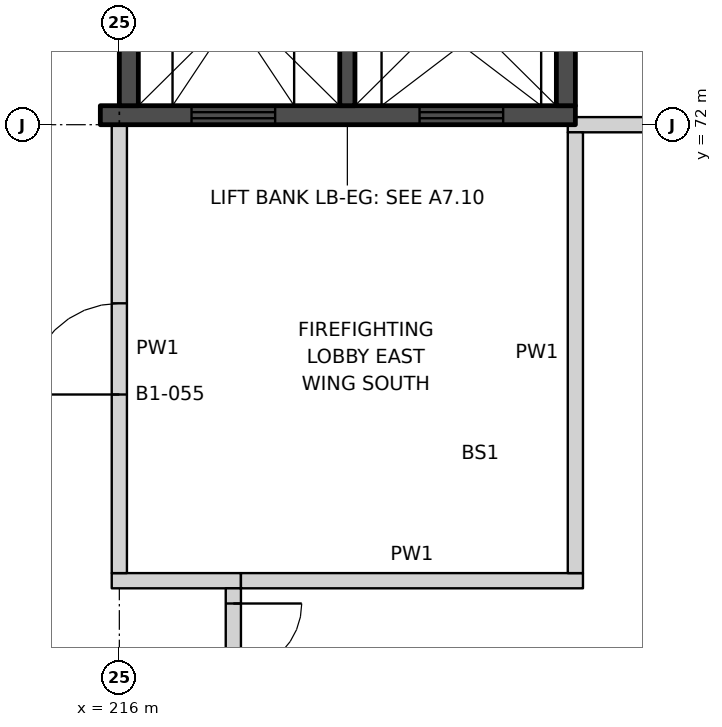
"""IFC4 building model, lengths in metres.
Left out: names, types, materials, properties, quantities, classifications, styles, units other than length and angle.
Written with IfcOpenShell. Run it as: python <this file> out.ifc"""

import sys

from ifc_helpers import new_model, si_unit, direction, frame, frame_2d, origin, place, context, subcontext, project, spatial, rectangle, extrude, element, fill, save


model = new_model("IFC4")
c1 = context("Model", 3, precision=1e-05, world=origin(), true_north=direction((0.0, 1.0)))
c2 = subcontext(c1, "Body", "Model", "MODEL_VIEW")
j1 = project(units=[si_unit("LENGTHUNIT", "METRE"), si_unit("PLANEANGLEUNIT", "RADIAN")], contexts=[c1])
p1 = place(None, origin())
s1 = spatial("IfcSite", under=j1, at=p1, CompositionType="ELEMENT")
p2 = place(p1, origin())
s2 = spatial("IfcBuilding", under=s1, at=p2, CompositionType="ELEMENT")
p3 = place(p2, frame((0.0, 0.0, -6.0)))
s3 = spatial("IfcBuildingStorey", under=s2, at=p3, CompositionType="ELEMENT", Elevation=-6.0)
p4 = place(p3, frame((215.9, 66.0, 0.0), z_axis=(0.0, 0.0, 1.0), x_axis=(1.0, 0.0, 0.0)))
e1 = element("IfcWall", 1, at=p4, inside=s3, PredefinedType="PARTITIONING", context=c2, shape_type="SweptSolid", body=[
    extrude(rectangle(XDim=1.7, YDim=0.2, at=frame_2d((0.85, 0.0))), origin(), (0.0, 0.0, 1.0), 6.0),
])
p5 = place(p3, frame((217.6, 66.0, 0.0), z_axis=(0.0, 0.0, 1.0), x_axis=(1.0, 0.0, 0.0)))
e2 = element("IfcWall", 2, at=p5, inside=s3, PredefinedType="PARTITIONING", context=c2, shape_type="SweptSolid", body=[
    extrude(rectangle(XDim=4.5, YDim=0.2, at=frame_2d((2.25, 0.0))), origin(), (0.0, 0.0, 1.0), 6.0),
])
p6 = place(p3, frame((221.9, 72.0, 0.0), z_axis=(0.0, 0.0, 1.0), x_axis=(1.0, 0.0, 0.0)))
e3 = element("IfcWall", 3, at=p6, inside=s3, PredefinedType="PARTITIONING", context=c2, shape_type="SweptSolid", body=[
    extrude(rectangle(XDim=2.65, YDim=0.2, at=frame_2d((1.325, 0.0))), origin(), (0.0, 0.0, 1.0), 4.85),
])
p7 = place(p3, frame((216.0, 66.1, 0.0), z_axis=(0.0, 0.0, 1.0), x_axis=(0.0, 1.0, 0.0)))
e4 = element("IfcWall", 4, at=p7, inside=s3, PredefinedType="PARTITIONING", context=c2, shape_type="SweptSolid", body=[
    extrude(rectangle(XDim=5.9, YDim=0.2, at=frame_2d((2.95, 0.0))), origin(), (0.0, 0.0, 1.0), 4.55),
])
p8 = place(p7, frame((2.35, 0.0, 0.0)))
e5 = element("IfcOpeningElement", 5, at=p8, cuts=e4, PredefinedType="OPENING", context=c2, shape_type="SweptSolid", body=[
    extrude(rectangle(XDim=1.2, YDim=2.1, at=frame_2d((0.6, 1.05))), frame((0.0, 0.11, 0.0), z_axis=(0.0, -1.0, 0.0), x_axis=(1.0, 0.0, 0.0)), (0.0, 0.0, 1.0), 0.22),
])
p9 = place(p3, frame((217.5, 54.1, 0.0), z_axis=(0.0, 0.0, 1.0), x_axis=(0.0, 1.0, 0.0)))
e6 = element("IfcWall", 6, at=p9, inside=s3, PredefinedType="PARTITIONING", context=c2, shape_type="SweptSolid", body=[
    extrude(rectangle(XDim=11.8, YDim=0.2, at=frame_2d((5.9, 0.0))), origin(), (0.0, 0.0, 1.0), 6.0),
])
p10 = place(p9, frame((3.5, 0.0, 0.0)))
e7 = element("IfcOpeningElement", 7, at=p10, cuts=e6, PredefinedType="OPENING", context=c2, shape_type="SweptSolid", body=[
    extrude(rectangle(XDim=1.8, YDim=2.1, at=frame_2d((0.9, 1.05))), frame((0.0, 0.11, 0.0), z_axis=(0.0, -1.0, 0.0), x_axis=(1.0, 0.0, 0.0)), (0.0, 0.0, 1.0), 0.22),
])
p11 = place(p9, frame((9.8, 0.0, 0.0)))
e8 = element("IfcOpeningElement", 8, at=p11, cuts=e6, PredefinedType="OPENING", context=c2, shape_type="SweptSolid", body=[
    extrude(rectangle(XDim=1.8, YDim=2.1, at=frame_2d((0.9, 1.05))), frame((0.0, 0.11, 0.0), z_axis=(0.0, -1.0, 0.0), x_axis=(1.0, 0.0, 0.0)), (0.0, 0.0, 1.0), 0.22),
])
p12 = place(p3, frame((222.0, 66.1, 0.0), z_axis=(0.0, 0.0, 1.0), x_axis=(0.0, 1.0, 0.0)))
e9 = element("IfcWall", 9, at=p12, inside=s3, PredefinedType="PARTITIONING", context=c2, shape_type="SweptSolid", body=[
    extrude(rectangle(XDim=5.8, YDim=0.2, at=frame_2d((2.9, 0.0))), origin(), (0.0, 0.0, 1.0), 6.0),
])
p13 = place(p3, frame((215.75, 72.125, -1.0), z_axis=(0.0, 0.0, 1.0), x_axis=(1.0, 0.0, 0.0)))
e10 = element("IfcWall", 10, at=p13, inside=s3, PredefinedType="SHEAR", context=c2, shape_type="SweptSolid", body=[
    extrude(rectangle(XDim=6.25, YDim=0.25, at=frame_2d((3.125, 0.0))), origin(), (0.0, 0.0, 1.0), 7.0),
])
p14 = place(p13, frame((1.2, 0.0, 1.0)))
e11 = element("IfcOpeningElement", 11, at=p14, cuts=e10, PredefinedType="OPENING", context=c2, shape_type="SweptSolid", body=[
    extrude(rectangle(XDim=1.1, YDim=2.1, at=frame_2d((0.55, 1.05))), frame((0.0, 0.135, 0.0), z_axis=(0.0, -1.0, 0.0), x_axis=(1.0, 0.0, 0.0)), (0.0, 0.0, 1.0), 0.27),
])
p15 = place(p13, frame((4.2, 0.0, 1.0)))
e12 = element("IfcOpeningElement", 12, at=p15, cuts=e10, PredefinedType="OPENING", context=c2, shape_type="SweptSolid", body=[
    extrude(rectangle(XDim=1.1, YDim=2.1, at=frame_2d((0.55, 1.05))), frame((0.0, 0.135, 0.0), z_axis=(0.0, -1.0, 0.0), x_axis=(1.0, 0.0, 0.0)), (0.0, 0.0, 1.0), 0.27),
])
for number, where, z_axis, x_axis in (
    (13, (216.125, 72.25, -1.0), (0.0, 0.0, 1.0), (0.0, 1.0, 0.0)),
    (14, (221.875, 72.25, -1.0), (0.0, 0.0, 1.0), (0.0, 1.0, 0.0)),
):
    element("IfcWall", number, at=place(p3, frame(where, z_axis=z_axis, x_axis=x_axis)), inside=s3, PredefinedType="SHEAR", context=c2, shape_type="SweptSolid", body=[
        extrude(rectangle(XDim=5.5, YDim=0.25, at=frame_2d((2.75, 0.0))), origin(), (0.0, 0.0, 1.0), 7.0),
    ])
p16 = place(p3, frame((219.0, 72.25, -1.0), z_axis=(0.0, 0.0, 1.0), x_axis=(0.0, 1.0, 0.0)))
e15 = element("IfcWall", 15, at=p16, inside=s3, PredefinedType="SHEAR", context=c2, shape_type="SweptSolid", body=[
    extrude(rectangle(XDim=2.625, YDim=0.2, at=frame_2d((1.312, 0.0))), origin(), (0.0, 0.0, 1.0), 7.0),
])
p17 = place(p8, origin())
e16 = element("IfcDoor", 16, at=p17, inside=s3, OperationType="SINGLE_SWING_LEFT", PredefinedType="DOOR", context=c2, shape_type="SweptSolid", body=[
    extrude(rectangle(XDim=1.2, YDim=2.1, at=frame_2d((0.6, 1.05))), frame((0.0, 0.025, 0.0), z_axis=(0.0, -1.0, 0.0), x_axis=(1.0, 0.0, 0.0)), (0.0, 0.0, 1.0), 0.05),
])
fill(e5, e16)
p18 = place(p11, frame((1.8, 0.0, 0.0), z_axis=(0.0, 0.0, 1.0), x_axis=(-1.0, 0.0, 0.0)))
e17 = element("IfcDoor", 17, at=p18, inside=s3, OperationType="DOUBLE_DOOR_DOUBLE_SWING", PredefinedType="DOOR", context=c2, shape_type="SweptSolid", body=[
    extrude(rectangle(XDim=1.8, YDim=2.1, at=frame_2d((0.9, 1.05))), frame((0.0, 0.025, 0.0), z_axis=(0.0, -1.0, 0.0), x_axis=(1.0, 0.0, 0.0)), (0.0, 0.0, 1.0), 0.05),
])
fill(e8, e17)
p19 = place(p14, origin())
e18 = element("IfcDoor", 18, at=p19, inside=s3, OperationType="DOUBLE_DOOR_SLIDING", PredefinedType="DOOR", context=c2, shape_type="SweptSolid", body=[
    extrude(rectangle(XDim=1.1, YDim=2.1, at=frame_2d((0.55, 1.05))), frame((0.0, 0.025, 0.0), z_axis=(0.0, -1.0, 0.0), x_axis=(1.0, 0.0, 0.0)), (0.0, 0.0, 1.0), 0.05),
])
fill(e11, e18)
p20 = place(p15, origin())
e19 = element("IfcDoor", 19, at=p20, inside=s3, OperationType="DOUBLE_DOOR_SLIDING", PredefinedType="DOOR", context=c2, shape_type="SweptSolid", body=[
    extrude(rectangle(XDim=1.1, YDim=2.1, at=frame_2d((0.55, 1.05))), frame((0.0, 0.025, 0.0), z_axis=(0.0, -1.0, 0.0), x_axis=(1.0, 0.0, 0.0)), (0.0, 0.0, 1.0), 0.05),
])
fill(e12, e19)
save(model, sys.argv[1])
